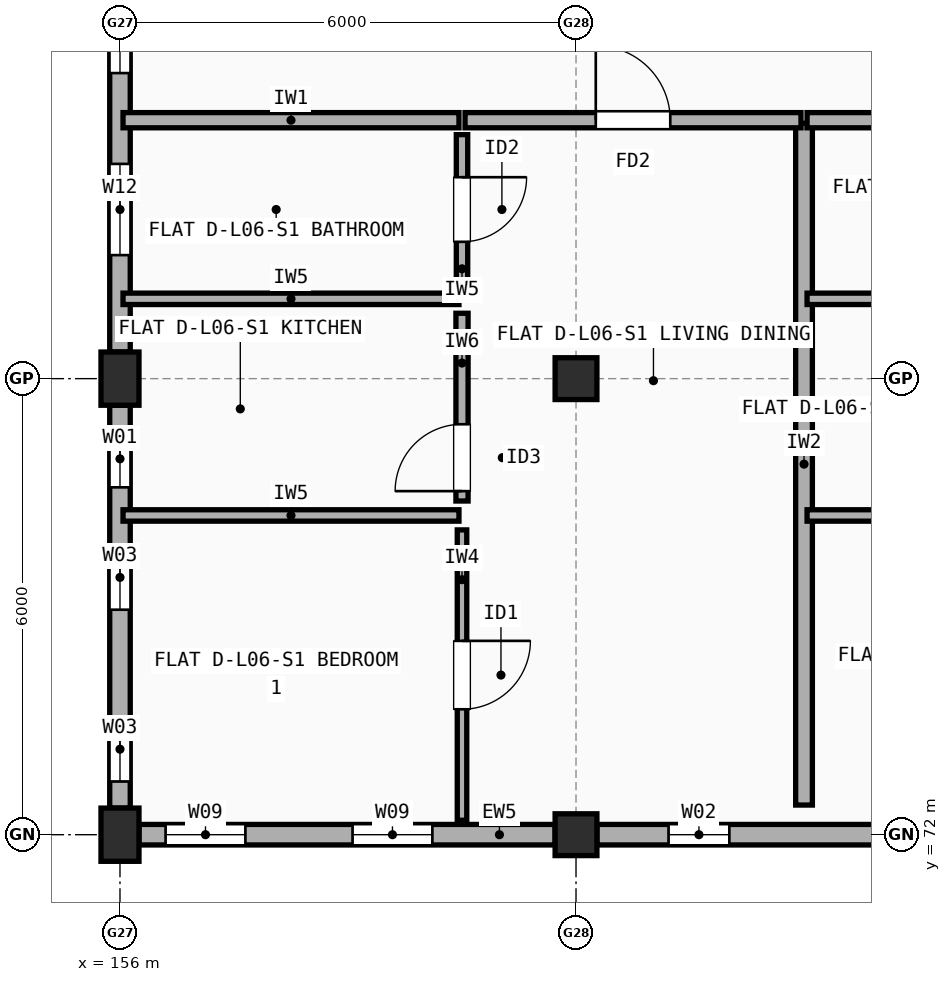
"""IFC4 building model, lengths in metres.
Left out: names, types, materials, properties, quantities, classifications, styles, units other than length and angle.
Written with IfcOpenShell. Run it as: python <this file> out.ifc"""

import sys

from ifc_helpers import new_model, si_unit, direction, frame, frame_2d, origin, origin_2d, place, context, subcontext, project, spatial, rectangle, extrude, element, fill, save


model = new_model("IFC4")
c1 = context("Model", 3, precision=1e-05, world=origin(), true_north=direction((0.0, 1.0)))
c2 = subcontext(c1, "Body", "Model", "MODEL_VIEW")
j1 = project(units=[si_unit("LENGTHUNIT", "METRE"), si_unit("PLANEANGLEUNIT", "RADIAN")], contexts=[c1])
p1 = place(None, origin())
s1 = spatial("IfcSite", under=j1, at=p1, CompositionType="ELEMENT")
p2 = place(p1, origin())
s2 = spatial("IfcBuilding", under=s1, at=p2, CompositionType="ELEMENT")
p3 = place(p2, frame((0.0, 0.0, 20.5)))
s3 = spatial("IfcBuildingStorey", under=s2, at=p3, CompositionType="ELEMENT", Elevation=20.5)
for number, where, z_axis, x_axis in (
    (1, (156.0, 72.0, 0.0), (0.0, 0.0, 1.0), (1.0, 0.0, 0.0)),
    (2, (156.0, 78.0, 0.0), (0.0, 0.0, 1.0), (1.0, 0.0, 0.0)),
):
    element("IfcColumn", number, at=place(p3, frame(where, z_axis=z_axis, x_axis=x_axis)), inside=s3, PredefinedType="COLUMN", context=c2, shape_type="SweptSolid", body=[
        extrude(rectangle(XDim=0.5, YDim=0.7, at=origin_2d()), origin(), (0.0, 0.0, 1.0), 2.97),
    ])
for number, where, z_axis, x_axis in (
    (3, (162.0, 72.0, 0.0), (0.0, 0.0, 1.0), (1.0, 0.0, 0.0)),
    (4, (162.0, 78.0, 0.0), (0.0, 0.0, 1.0), (1.0, 0.0, 0.0)),
):
    element("IfcColumn", number, at=place(p3, frame(where, z_axis=z_axis, x_axis=x_axis)), inside=s3, PredefinedType="COLUMN", context=c2, shape_type="SweptSolid", body=[
        extrude(rectangle(XDim=0.55, YDim=0.55, at=origin_2d()), origin(), (0.0, 0.0, 1.0), 2.97),
    ])
p4 = place(p3, frame((156.25, 72.0, 0.0), z_axis=(0.0, 0.0, 1.0), x_axis=(1.0, 0.0, 0.0)))
e5 = element("IfcWall", 5, at=p4, inside=s3, PredefinedType="STANDARD", context=c2, shape_type="SweptSolid", body=[
    extrude(rectangle(XDim=5.475, YDim=0.27, at=frame_2d((2.738, 0.0))), origin(), (0.0, 0.0, 1.0), 2.452),
])
p5 = place(p4, frame((0.35, 0.0, 0.9)))
e6 = element("IfcOpeningElement", 6, at=p5, cuts=e5, PredefinedType="OPENING", context=c2, shape_type="SweptSolid", body=[
    extrude(rectangle(XDim=1.05, YDim=1.35, at=frame_2d((0.525, 0.675))), frame((0.0, 0.145, 0.0), z_axis=(0.0, -1.0, 0.0), x_axis=(1.0, 0.0, 0.0)), (0.0, 0.0, 1.0), 0.29),
])
p6 = place(p4, frame((2.81, 0.0, 0.9)))
e7 = element("IfcOpeningElement", 7, at=p6, cuts=e5, PredefinedType="OPENING", context=c2, shape_type="SweptSolid", body=[
    extrude(rectangle(XDim=1.05, YDim=1.35, at=frame_2d((0.525, 0.675))), frame((0.0, 0.145, 0.0), z_axis=(0.0, -1.0, 0.0), x_axis=(1.0, 0.0, 0.0)), (0.0, 0.0, 1.0), 0.29),
])
p7 = place(p3, frame((162.275, 72.0, 0.0), z_axis=(0.0, 0.0, 1.0), x_axis=(1.0, 0.0, 0.0)))
e8 = element("IfcWall", 8, at=p7, inside=s3, PredefinedType="STANDARD", context=c2, shape_type="SweptSolid", body=[
    extrude(rectangle(XDim=5.45, YDim=0.27, at=frame_2d((2.725, 0.0))), origin(), (0.0, 0.0, 1.0), 2.452),
])
p8 = place(p7, frame((0.942, 0.0, 0.9)))
e9 = element("IfcOpeningElement", 9, at=p8, cuts=e8, PredefinedType="OPENING", context=c2, shape_type="SweptSolid", body=[
    extrude(rectangle(XDim=0.8, YDim=1.2, at=frame_2d((0.4, 0.6))), frame((0.0, 0.145, 0.0), z_axis=(0.0, -1.0, 0.0), x_axis=(1.0, 0.0, 0.0)), (0.0, 0.0, 1.0), 0.29),
])
p9 = place(p7, frame((3.683, 0.0, 0.9)))
e10 = element("IfcOpeningElement", 10, at=p9, cuts=e8, PredefinedType="OPENING", context=c2, shape_type="SweptSolid", body=[
    extrude(rectangle(XDim=0.85, YDim=1.25, at=frame_2d((0.425, 0.625))), frame((0.0, 0.145, 0.0), z_axis=(0.0, -1.0, 0.0), x_axis=(1.0, 0.0, 0.0)), (0.0, 0.0, 1.0), 0.29),
])
p10 = place(p3, frame((156.0, 83.65, 0.0), z_axis=(0.0, 0.0, 1.0), x_axis=(0.0, -1.0, 0.0)))
e11 = element("IfcWall", 11, at=p10, inside=s3, PredefinedType="STANDARD", context=c2, shape_type="SweptSolid", body=[
    extrude(rectangle(XDim=5.3, YDim=0.27, at=frame_2d((2.65, 0.0))), origin(), (0.0, 0.0, 1.0), 2.452),
])
p11 = place(p10, frame((0.58, 0.0, 0.9)))
e12 = element("IfcOpeningElement", 12, at=p11, cuts=e11, PredefinedType="OPENING", context=c2, shape_type="SweptSolid", body=[
    extrude(rectangle(XDim=1.05, YDim=1.35, at=frame_2d((0.525, 0.675))), frame((0.0, 0.145, 0.0), z_axis=(0.0, -1.0, 0.0), x_axis=(1.0, 0.0, 0.0)), (0.0, 0.0, 1.0), 0.29),
])
p12 = place(p10, frame((2.825, 0.0, 0.9)))
e13 = element("IfcOpeningElement", 13, at=p12, cuts=e11, PredefinedType="OPENING", context=c2, shape_type="SweptSolid", body=[
    extrude(rectangle(XDim=1.2, YDim=1.35, at=frame_2d((0.6, 0.675))), frame((0.0, 0.145, 0.0), z_axis=(0.0, -1.0, 0.0), x_axis=(1.0, 0.0, 0.0)), (0.0, 0.0, 1.0), 0.29),
])
p13 = place(p3, frame((156.0, 77.65, 0.0), z_axis=(0.0, 0.0, 1.0), x_axis=(0.0, -1.0, 0.0)))
e14 = element("IfcWall", 14, at=p13, inside=s3, PredefinedType="STANDARD", context=c2, shape_type="SweptSolid", body=[
    extrude(rectangle(XDim=5.3, YDim=0.27, at=frame_2d((2.65, 0.0))), origin(), (0.0, 0.0, 1.0), 2.452),
])
p14 = place(p13, frame((0.33, 0.0, 0.9)))
e15 = element("IfcOpeningElement", 15, at=p14, cuts=e14, PredefinedType="OPENING", context=c2, shape_type="SweptSolid", body=[
    extrude(rectangle(XDim=0.75, YDim=1.15, at=frame_2d((0.375, 0.575))), frame((0.0, 0.145, 0.0), z_axis=(0.0, -1.0, 0.0), x_axis=(1.0, 0.0, 0.0)), (0.0, 0.0, 1.0), 0.29),
])
p15 = place(p13, frame((1.84, 0.0, 0.9)))
e16 = element("IfcOpeningElement", 16, at=p15, cuts=e14, PredefinedType="OPENING", context=c2, shape_type="SweptSolid", body=[
    extrude(rectangle(XDim=0.85, YDim=1.25, at=frame_2d((0.425, 0.625))), frame((0.0, 0.145, 0.0), z_axis=(0.0, -1.0, 0.0), x_axis=(1.0, 0.0, 0.0)), (0.0, 0.0, 1.0), 0.29),
])
p16 = place(p13, frame((4.1, 0.0, 0.9)))
e17 = element("IfcOpeningElement", 17, at=p16, cuts=e14, PredefinedType="OPENING", context=c2, shape_type="SweptSolid", body=[
    extrude(rectangle(XDim=0.85, YDim=1.25, at=frame_2d((0.425, 0.625))), frame((0.0, 0.145, 0.0), z_axis=(0.0, -1.0, 0.0), x_axis=(1.0, 0.0, 0.0)), (0.0, 0.0, 1.0), 0.29),
])
p17 = place(p3, frame((165.0, 72.39, 0.0), z_axis=(0.0, 0.0, 1.0), x_axis=(0.0, 1.0, 0.0)))
e18 = element("IfcWall", 18, at=p17, inside=s3, PredefinedType="SOLIDWALL", context=c2, shape_type="SweptSolid", body=[
    extrude(rectangle(XDim=8.97, YDim=0.22, at=frame_2d((4.485, 0.0))), origin(), (0.0, 0.0, 1.0), 2.452),
])
p18 = place(p3, frame((156.04, 81.4, 0.0), z_axis=(0.0, 0.0, 1.0), x_axis=(1.0, 0.0, 0.0)))
e19 = element("IfcWall", 19, at=p18, inside=s3, PredefinedType="SOLIDWALL", context=c2, shape_type="SweptSolid", body=[
    extrude(rectangle(XDim=4.42, YDim=0.2, at=frame_2d((2.21, 0.0))), origin(), (0.0, 0.0, 1.0), 2.452),
])
p19 = place(p3, frame((160.54, 81.4, 0.0), z_axis=(0.0, 0.0, 1.0), x_axis=(1.0, 0.0, 0.0)))
e20 = element("IfcWall", 20, at=p19, inside=s3, PredefinedType="SOLIDWALL", context=c2, shape_type="SweptSolid", body=[
    extrude(rectangle(XDim=4.42, YDim=0.2, at=frame_2d((2.21, 0.0))), origin(), (0.0, 0.0, 1.0), 2.458),
])
p20 = place(p19, frame((1.72, 0.0, 0.0)))
e21 = element("IfcOpeningElement", 21, at=p20, cuts=e20, PredefinedType="OPENING", context=c2, shape_type="SweptSolid", body=[
    extrude(rectangle(XDim=0.98, YDim=2.15, at=frame_2d((0.49, 1.075))), frame((0.0, 0.11, 0.0), z_axis=(0.0, -1.0, 0.0), x_axis=(1.0, 0.0, 0.0)), (0.0, 0.0, 1.0), 0.22),
])
p21 = place(p3, frame((160.5, 72.19, 0.0), z_axis=(0.0, 0.0, 1.0), x_axis=(0.0, 1.0, 0.0)))
e22 = element("IfcWall", 22, at=p21, inside=s3, PredefinedType="PARTITIONING", context=c2, shape_type="SweptSolid", body=[
    extrude(rectangle(XDim=3.82, YDim=0.125, at=frame_2d((1.91, 0.0))), origin(), (0.0, 0.0, 1.0), 2.97),
])
p22 = place(p21, frame((1.46, 0.0, 0.0)))
e23 = element("IfcOpeningElement", 23, at=p22, cuts=e22, PredefinedType="OPENING", context=c2, shape_type="SweptSolid", body=[
    extrude(rectangle(XDim=0.9, YDim=2.1, at=frame_2d((0.45, 1.05))), frame((0.0, 0.073, 0.0), z_axis=(0.0, -1.0, 0.0), x_axis=(1.0, 0.0, 0.0)), (0.0, 0.0, 1.0), 0.145),
])
p23 = place(p3, frame((160.5, 76.39, 0.0), z_axis=(0.0, 0.0, 1.0), x_axis=(0.0, 1.0, 0.0)))
e24 = element("IfcWall", 24, at=p23, inside=s3, PredefinedType="PLUMBINGWALL", context=c2, shape_type="SweptSolid", body=[
    extrude(rectangle(XDim=2.47, YDim=0.16, at=frame_2d((1.235, 0.0))), origin(), (0.0, 0.0, 1.0), 2.452),
])
p24 = place(p23, frame((0.13, 0.0, 0.0)))
e25 = element("IfcOpeningElement", 25, at=p24, cuts=e24, PredefinedType="OPENING", context=c2, shape_type="SweptSolid", body=[
    extrude(rectangle(XDim=0.88, YDim=2.1, at=frame_2d((0.44, 1.05))), frame((0.0, 0.09, 0.0), z_axis=(0.0, -1.0, 0.0), x_axis=(1.0, 0.0, 0.0)), (0.0, 0.0, 1.0), 0.18),
])
p25 = place(p3, frame((160.5, 79.24, 0.0), z_axis=(0.0, 0.0, 1.0), x_axis=(0.0, 1.0, 0.0)))
e26 = element("IfcWall", 26, at=p25, inside=s3, PredefinedType="PARTITIONING", context=c2, shape_type="SweptSolid", body=[
    extrude(rectangle(XDim=1.97, YDim=0.15, at=frame_2d((0.985, 0.0))), origin(), (0.0, 0.0, 1.0), 2.97),
])
p26 = place(p25, frame((0.56, 0.0, 0.0)))
e27 = element("IfcOpeningElement", 27, at=p26, cuts=e26, PredefinedType="OPENING", context=c2, shape_type="SweptSolid", body=[
    extrude(rectangle(XDim=0.85, YDim=2.1, at=frame_2d((0.425, 1.05))), frame((0.0, 0.085, 0.0), z_axis=(0.0, -1.0, 0.0), x_axis=(1.0, 0.0, 0.0)), (0.0, 0.0, 1.0), 0.17),
])
for number, where, z_axis, x_axis in (
    (28, (156.04, 76.2, 0.0), (0.0, 0.0, 1.0), (1.0, 0.0, 0.0)),
    (29, (156.04, 79.05, 0.0), (0.0, 0.0, 1.0), (1.0, 0.0, 0.0)),
):
    element("IfcWall", number, at=place(p3, frame(where, z_axis=z_axis, x_axis=x_axis)), inside=s3, PredefinedType="PARTITIONING", context=c2, shape_type="SweptSolid", body=[
        extrude(rectangle(XDim=4.42, YDim=0.15, at=frame_2d((2.21, 0.0))), origin(), (0.0, 0.0, 1.0), 2.452),
    ])
p27 = place(p3, frame((165.04, 81.4, 0.0), z_axis=(0.0, 0.0, 1.0), x_axis=(1.0, 0.0, 0.0)))
e30 = element("IfcWall", 30, at=p27, inside=s3, PredefinedType="SOLIDWALL", context=c2, shape_type="SweptSolid", body=[
    extrude(rectangle(XDim=4.42, YDim=0.2, at=frame_2d((2.21, 0.0))), origin(), (0.0, 0.0, 1.0), 2.458),
])
p28 = place(p3, frame((165.04, 76.2, 0.0), z_axis=(0.0, 0.0, 1.0), x_axis=(1.0, 0.0, 0.0)))
e31 = element("IfcWall", 31, at=p28, inside=s3, PredefinedType="PARTITIONING", context=c2, shape_type="SweptSolid", body=[
    extrude(rectangle(XDim=4.42, YDim=0.15, at=frame_2d((2.21, 0.0))), origin(), (0.0, 0.0, 1.0), 2.508),
])
p29 = place(p3, frame((165.04, 79.05, 0.0), z_axis=(0.0, 0.0, 1.0), x_axis=(1.0, 0.0, 0.0)))
e32 = element("IfcWall", 32, at=p29, inside=s3, PredefinedType="PARTITIONING", context=c2, shape_type="SweptSolid", body=[
    extrude(rectangle(XDim=4.42, YDim=0.15, at=frame_2d((2.21, 0.0))), origin(), (0.0, 0.0, 1.0), 2.458),
])
p30 = place(p5, origin())
e33 = element("IfcWindow", 33, at=p30, inside=s3, PartitioningType="SINGLE_PANEL", PredefinedType="WINDOW", context=c2, shape_type="SweptSolid", body=[
    extrude(rectangle(XDim=1.05, YDim=1.35, at=frame_2d((0.525, 0.675))), frame((0.0, 0.03, 0.0), z_axis=(0.0, -1.0, 0.0), x_axis=(1.0, 0.0, 0.0)), (0.0, 0.0, 1.0), 0.06),
])
fill(e6, e33)
p31 = place(p6, origin())
e34 = element("IfcWindow", 34, at=p31, inside=s3, PartitioningType="SINGLE_PANEL", PredefinedType="WINDOW", context=c2, shape_type="SweptSolid", body=[
    extrude(rectangle(XDim=1.05, YDim=1.35, at=frame_2d((0.525, 0.675))), frame((0.0, 0.03, 0.0), z_axis=(0.0, -1.0, 0.0), x_axis=(1.0, 0.0, 0.0)), (0.0, 0.0, 1.0), 0.06),
])
fill(e7, e34)
p32 = place(p8, origin())
e35 = element("IfcWindow", 35, at=p32, inside=s3, PartitioningType="SINGLE_PANEL", PredefinedType="WINDOW", context=c2, shape_type="SweptSolid", body=[
    extrude(rectangle(XDim=0.8, YDim=1.2, at=frame_2d((0.4, 0.6))), frame((0.0, 0.03, 0.0), z_axis=(0.0, -1.0, 0.0), x_axis=(1.0, 0.0, 0.0)), (0.0, 0.0, 1.0), 0.06),
])
fill(e9, e35)
p33 = place(p11, origin())
e36 = element("IfcWindow", 36, at=p33, inside=s3, PartitioningType="SINGLE_PANEL", PredefinedType="WINDOW", context=c2, shape_type="SweptSolid", body=[
    extrude(rectangle(XDim=1.05, YDim=1.35, at=frame_2d((0.525, 0.675))), frame((0.0, 0.03, 0.0), z_axis=(0.0, -1.0, 0.0), x_axis=(1.0, 0.0, 0.0)), (0.0, 0.0, 1.0), 0.06),
])
fill(e12, e36)
p34 = place(p12, origin())
e37 = element("IfcWindow", 37, at=p34, inside=s3, PartitioningType="SINGLE_PANEL", PredefinedType="WINDOW", context=c2, shape_type="SweptSolid", body=[
    extrude(rectangle(XDim=1.2, YDim=1.35, at=frame_2d((0.6, 0.675))), frame((0.0, 0.03, 0.0), z_axis=(0.0, -1.0, 0.0), x_axis=(1.0, 0.0, 0.0)), (0.0, 0.0, 1.0), 0.06),
])
fill(e13, e37)
p35 = place(p14, origin())
e38 = element("IfcWindow", 38, at=p35, inside=s3, PartitioningType="SINGLE_PANEL", PredefinedType="WINDOW", context=c2, shape_type="SweptSolid", body=[
    extrude(rectangle(XDim=0.75, YDim=1.15, at=frame_2d((0.375, 0.575))), frame((0.0, 0.03, 0.0), z_axis=(0.0, -1.0, 0.0), x_axis=(1.0, 0.0, 0.0)), (0.0, 0.0, 1.0), 0.06),
])
fill(e15, e38)
p36 = place(p15, origin())
e39 = element("IfcWindow", 39, at=p36, inside=s3, PartitioningType="SINGLE_PANEL", PredefinedType="WINDOW", context=c2, shape_type="SweptSolid", body=[
    extrude(rectangle(XDim=0.85, YDim=1.25, at=frame_2d((0.425, 0.625))), frame((0.0, 0.03, 0.0), z_axis=(0.0, -1.0, 0.0), x_axis=(1.0, 0.0, 0.0)), (0.0, 0.0, 1.0), 0.06),
])
fill(e16, e39)
p37 = place(p16, origin())
e40 = element("IfcWindow", 40, at=p37, inside=s3, PartitioningType="SINGLE_PANEL", PredefinedType="WINDOW", context=c2, shape_type="SweptSolid", body=[
    extrude(rectangle(XDim=0.85, YDim=1.25, at=frame_2d((0.425, 0.625))), frame((0.0, 0.03, 0.0), z_axis=(0.0, -1.0, 0.0), x_axis=(1.0, 0.0, 0.0)), (0.0, 0.0, 1.0), 0.06),
])
fill(e17, e40)
p38 = place(p20, origin())
e41 = element("IfcDoor", 41, at=p38, inside=s3, OperationType="SINGLE_SWING_LEFT", PredefinedType="DOOR", context=c2, shape_type="SweptSolid", body=[
    extrude(rectangle(XDim=0.98, YDim=2.15, at=frame_2d((0.49, 1.075))), frame((0.0, 0.025, 0.0), z_axis=(0.0, -1.0, 0.0), x_axis=(1.0, 0.0, 0.0)), (0.0, 0.0, 1.0), 0.05),
])
fill(e21, e41)
p39 = place(p22, origin())
e42 = element("IfcDoor", 42, at=p39, inside=s3, OperationType="SINGLE_SWING_RIGHT", PredefinedType="DOOR", context=c2, shape_type="SweptSolid", body=[
    extrude(rectangle(XDim=0.9, YDim=2.1, at=frame_2d((0.45, 1.05))), frame((0.0, 0.025, 0.0), z_axis=(0.0, -1.0, 0.0), x_axis=(1.0, 0.0, 0.0)), (0.0, 0.0, 1.0), 0.05),
])
fill(e23, e42)
p40 = place(p24, origin())
e43 = element("IfcDoor", 43, at=p40, inside=s3, OperationType="SINGLE_SWING_LEFT", PredefinedType="DOOR", context=c2, shape_type="SweptSolid", body=[
    extrude(rectangle(XDim=0.88, YDim=2.1, at=frame_2d((0.44, 1.05))), frame((0.0, 0.025, 0.0), z_axis=(0.0, -1.0, 0.0), x_axis=(1.0, 0.0, 0.0)), (0.0, 0.0, 1.0), 0.05),
])
fill(e25, e43)
p41 = place(p26, origin())
e44 = element("IfcDoor", 44, at=p41, inside=s3, OperationType="SINGLE_SWING_RIGHT", PredefinedType="DOOR", context=c2, shape_type="SweptSolid", body=[
    extrude(rectangle(XDim=0.85, YDim=2.1, at=frame_2d((0.425, 1.05))), frame((0.0, 0.025, 0.0), z_axis=(0.0, -1.0, 0.0), x_axis=(1.0, 0.0, 0.0)), (0.0, 0.0, 1.0), 0.05),
])
fill(e27, e44)
save(model, sys.argv[1])
